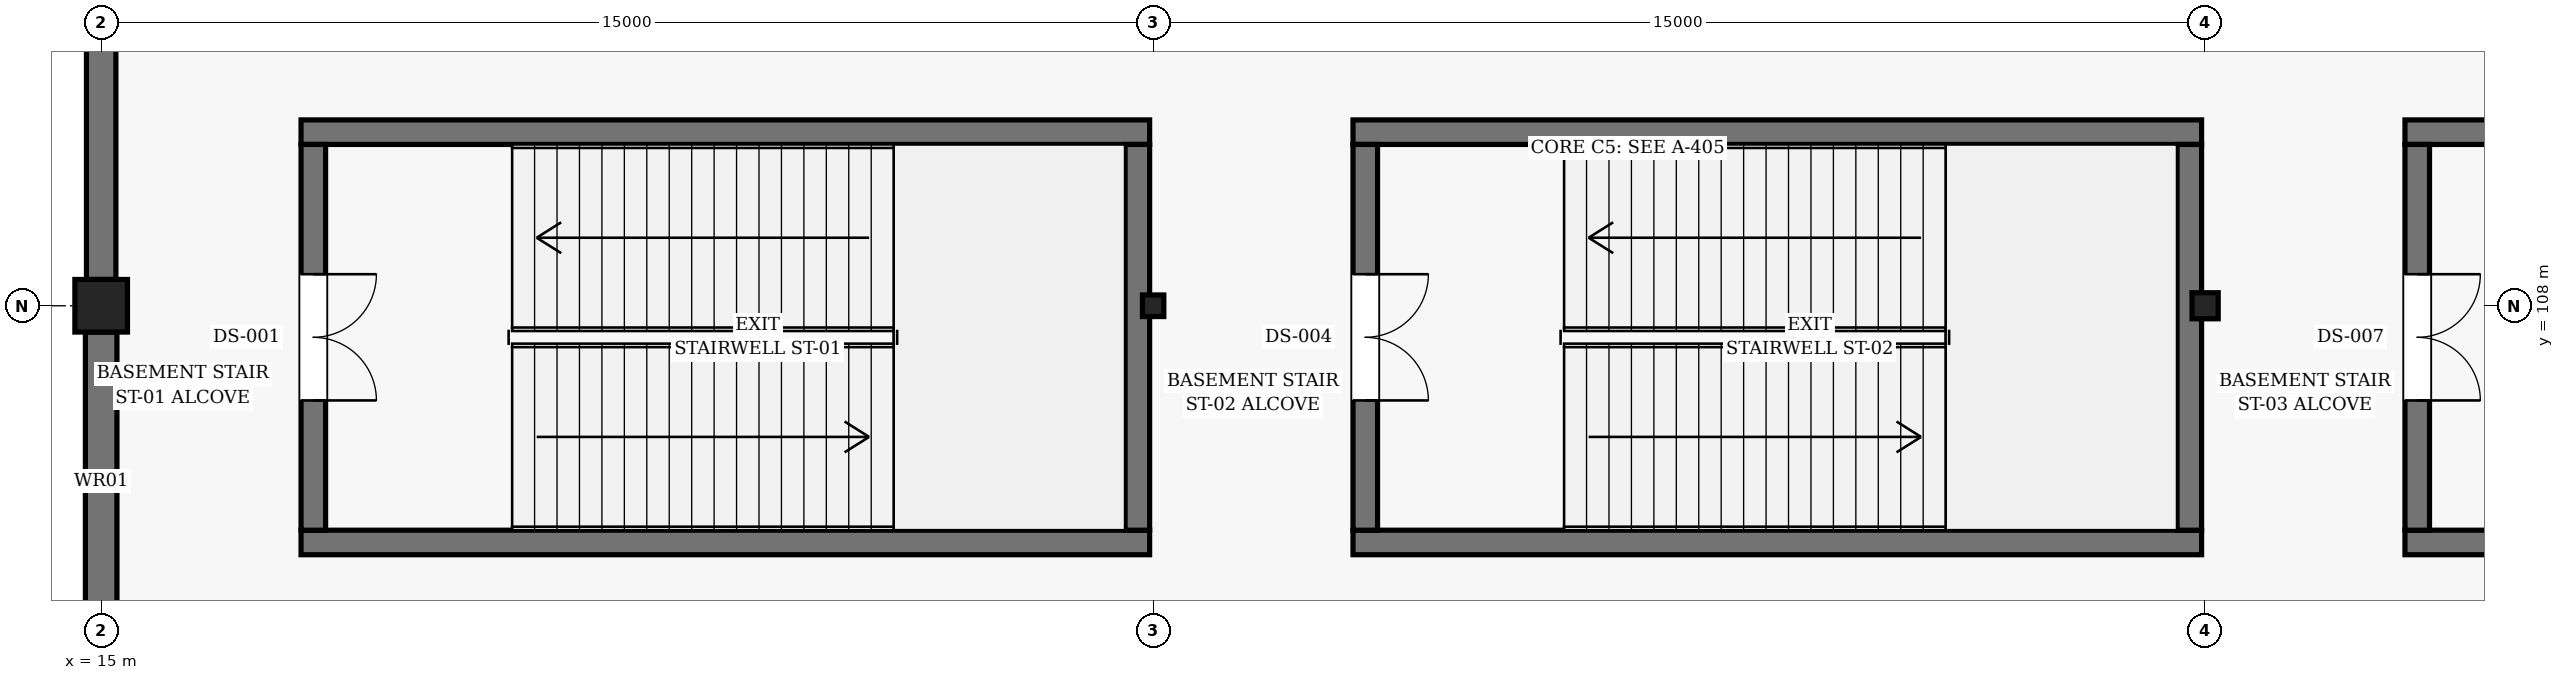
"""IFC4 building model, lengths in metres.
Left out: names, types, materials, properties, quantities, classifications, styles, units other than length and angle.
Written with IfcOpenShell. Run it as: python <this file> out.ifc"""

import sys

from ifc_helpers import new_model, si_unit, direction, frame, frame_2d, origin, origin_2d, place, context, subcontext, project, spatial, rectangle, i_section, extrude, element, fill, save


model = new_model("IFC4")
c1 = context("Model", 3, precision=1e-05, world=origin(), true_north=direction((0.0, 1.0)))
c2 = subcontext(c1, "Body", "Model", "MODEL_VIEW")
j1 = project(units=[si_unit("LENGTHUNIT", "METRE"), si_unit("PLANEANGLEUNIT", "RADIAN")], contexts=[c1])
p1 = place(None, origin())
s1 = spatial("IfcSite", under=j1, at=p1, CompositionType="ELEMENT")
p2 = place(p1, origin())
s2 = spatial("IfcBuilding", under=s1, at=p2, CompositionType="ELEMENT")
p3 = place(p2, frame((0.0, 0.0, -5.4)))
s3 = spatial("IfcBuildingStorey", under=s2, at=p3, CompositionType="ELEMENT", Elevation=-5.4)
p4 = place(p3, frame((15.0, 108.0, 0.0), z_axis=(0.0, 0.0, 1.0), x_axis=(1.0, 0.0, 0.0)))
e1 = element("IfcColumn", 1, at=p4, inside=s3, PredefinedType="COLUMN", context=c2, shape_type="SweptSolid", body=[
    extrude(rectangle(XDim=0.75, YDim=0.75, at=origin_2d()), origin(), (0.0, 0.0, 1.0), 5.4),
])
p5 = place(p3, frame((30.0, 108.0, 0.0), z_axis=(0.0, 0.0, 1.0), x_axis=(1.0, 0.0, 0.0)))
e2 = element("IfcColumn", 2, at=p5, inside=s3, PredefinedType="COLUMN", context=c2, shape_type="SweptSolid", body=[
    extrude(i_section(OverallWidth=0.305, OverallDepth=0.308, WebThickness=0.01, FlangeThickness=0.015, FilletRadius=0.015, at=origin_2d()), origin(), (0.0, 0.0, 1.0), 5.4),
])
p6 = place(p3, frame((45.0, 108.0, 0.0), z_axis=(0.0, 0.0, 1.0), x_axis=(1.0, 0.0, 0.0)))
e3 = element("IfcColumn", 3, at=p6, inside=s3, PredefinedType="COLUMN", context=c2, shape_type="SweptSolid", body=[
    extrude(i_section(OverallWidth=0.374, OverallDepth=0.372, WebThickness=0.016, FlangeThickness=0.026, FilletRadius=0.016, at=origin_2d()), origin(), (0.0, 0.0, 1.0), 5.4),
])
p7 = place(p3, frame((15.0, 103.375, 0.0), z_axis=(0.0, 0.0, 1.0), x_axis=(0.0, 1.0, 0.0)))
e4 = element("IfcWall", 4, at=p7, inside=s3, PredefinedType="USERDEFINED", context=c2, shape_type="SweptSolid", body=[
    extrude(rectangle(XDim=4.25, YDim=0.45, at=frame_2d((2.125, 0.0))), origin(), (0.0, 0.0, 1.0), 4.37),
])
p8 = place(p3, frame((15.0, 108.375, 0.0), z_axis=(0.0, 0.0, 1.0), x_axis=(0.0, 1.0, 0.0)))
e5 = element("IfcWall", 5, at=p8, inside=s3, PredefinedType="USERDEFINED", context=c2, shape_type="SweptSolid", body=[
    extrude(rectangle(XDim=8.25, YDim=0.42, at=frame_2d((4.125, 0.0))), origin(), (0.0, 0.0, 1.0), 4.381),
])
for number, where, z_axis, x_axis in (
    (6, (17.85, 104.625, 0.0), (0.0, 0.0, 1.0), (1.0, 0.0, 0.0)),
    (7, (29.95, 110.475, 0.0), (0.0, 0.0, 1.0), (-1.0, 0.0, 0.0)),
):
    element("IfcWall", number, at=place(p3, frame(where, z_axis=z_axis, x_axis=x_axis)), inside=s3, PredefinedType="SHEAR", context=c2, shape_type="SweptSolid", body=[
        extrude(rectangle(XDim=12.1, YDim=0.35, at=frame_2d((6.05, 0.0))), origin(), (0.0, 0.0, 1.0), 5.08),
    ])
p9 = place(p3, frame((18.025, 110.3, 0.0), z_axis=(0.0, 0.0, 1.0), x_axis=(0.0, -1.0, 0.0)))
e8 = element("IfcWall", 8, at=p9, inside=s3, PredefinedType="SHEAR", context=c2, shape_type="SweptSolid", body=[
    extrude(rectangle(XDim=5.5, YDim=0.35, at=frame_2d((2.75, 0.0))), origin(), (0.0, 0.0, 1.0), 5.08),
])
p10 = place(p9, frame((1.85, 0.0, 0.0)))
e9 = element("IfcOpeningElement", 9, at=p10, cuts=e8, PredefinedType="OPENING", context=c2, shape_type="SweptSolid", body=[
    extrude(rectangle(XDim=1.8, YDim=2.2, at=frame_2d((0.9, 1.1))), frame((0.0, 0.185, 0.0), z_axis=(0.0, -1.0, 0.0), x_axis=(1.0, 0.0, 0.0)), (0.0, 0.0, 1.0), 0.37),
])
p11 = place(p3, frame((29.775, 104.8, 0.0), z_axis=(0.0, 0.0, 1.0), x_axis=(0.0, 1.0, 0.0)))
e10 = element("IfcWall", 10, at=p11, inside=s3, PredefinedType="SHEAR", context=c2, shape_type="SweptSolid", body=[
    extrude(rectangle(XDim=5.5, YDim=0.35, at=frame_2d((2.75, 0.0))), origin(), (0.0, 0.0, 1.0), 5.08),
])
for number, where, z_axis, x_axis in (
    (11, (32.85, 104.625, 0.0), (0.0, 0.0, 1.0), (1.0, 0.0, 0.0)),
    (12, (44.95, 110.475, 0.0), (0.0, 0.0, 1.0), (-1.0, 0.0, 0.0)),
):
    element("IfcWall", number, at=place(p3, frame(where, z_axis=z_axis, x_axis=x_axis)), inside=s3, PredefinedType="SHEAR", context=c2, shape_type="SweptSolid", body=[
        extrude(rectangle(XDim=12.1, YDim=0.35, at=frame_2d((6.05, 0.0))), origin(), (0.0, 0.0, 1.0), 5.08),
    ])
p12 = place(p3, frame((33.025, 110.3, 0.0), z_axis=(0.0, 0.0, 1.0), x_axis=(0.0, -1.0, 0.0)))
e13 = element("IfcWall", 13, at=p12, inside=s3, PredefinedType="SHEAR", context=c2, shape_type="SweptSolid", body=[
    extrude(rectangle(XDim=5.5, YDim=0.35, at=frame_2d((2.75, 0.0))), origin(), (0.0, 0.0, 1.0), 5.08),
])
p13 = place(p12, frame((1.85, 0.0, 0.0)))
e14 = element("IfcOpeningElement", 14, at=p13, cuts=e13, PredefinedType="OPENING", context=c2, shape_type="SweptSolid", body=[
    extrude(rectangle(XDim=1.8, YDim=2.2, at=frame_2d((0.9, 1.1))), frame((0.0, 0.185, 0.0), z_axis=(0.0, -1.0, 0.0), x_axis=(1.0, 0.0, 0.0)), (0.0, 0.0, 1.0), 0.37),
])
p14 = place(p3, frame((44.775, 104.8, 0.0), z_axis=(0.0, 0.0, 1.0), x_axis=(0.0, 1.0, 0.0)))
e15 = element("IfcWall", 15, at=p14, inside=s3, PredefinedType="SHEAR", context=c2, shape_type="SweptSolid", body=[
    extrude(rectangle(XDim=5.5, YDim=0.35, at=frame_2d((2.75, 0.0))), origin(), (0.0, 0.0, 1.0), 5.08),
])
for number, where, z_axis, x_axis in (
    (16, (47.85, 104.625, 0.0), (0.0, 0.0, 1.0), (1.0, 0.0, 0.0)),
    (17, (59.95, 110.475, 0.0), (0.0, 0.0, 1.0), (-1.0, 0.0, 0.0)),
):
    element("IfcWall", number, at=place(p3, frame(where, z_axis=z_axis, x_axis=x_axis)), inside=s3, PredefinedType="SHEAR", context=c2, shape_type="SweptSolid", body=[
        extrude(rectangle(XDim=12.1, YDim=0.35, at=frame_2d((6.05, 0.0))), origin(), (0.0, 0.0, 1.0), 5.08),
    ])
p15 = place(p3, frame((48.025, 110.3, 0.0), z_axis=(0.0, 0.0, 1.0), x_axis=(0.0, -1.0, 0.0)))
e18 = element("IfcWall", 18, at=p15, inside=s3, PredefinedType="SHEAR", context=c2, shape_type="SweptSolid", body=[
    extrude(rectangle(XDim=5.5, YDim=0.35, at=frame_2d((2.75, 0.0))), origin(), (0.0, 0.0, 1.0), 5.08),
])
p16 = place(p15, frame((1.85, 0.0, 0.0)))
e19 = element("IfcOpeningElement", 19, at=p16, cuts=e18, PredefinedType="OPENING", context=c2, shape_type="SweptSolid", body=[
    extrude(rectangle(XDim=1.8, YDim=2.2, at=frame_2d((0.9, 1.1))), frame((0.0, 0.185, 0.0), z_axis=(0.0, -1.0, 0.0), x_axis=(1.0, 0.0, 0.0)), (0.0, 0.0, 1.0), 0.37),
])
p17 = place(p10, origin())
e20 = element("IfcDoor", 20, at=p17, inside=s3, OperationType="DOUBLE_DOOR_SINGLE_SWING", PredefinedType="DOOR", context=c2, shape_type="SweptSolid", body=[
    extrude(rectangle(XDim=1.8, YDim=2.2, at=frame_2d((0.9, 1.1))), frame((0.0, 0.025, 0.0), z_axis=(0.0, -1.0, 0.0), x_axis=(1.0, 0.0, 0.0)), (0.0, 0.0, 1.0), 0.05),
])
fill(e9, e20)
p18 = place(p13, origin())
e21 = element("IfcDoor", 21, at=p18, inside=s3, OperationType="DOUBLE_DOOR_SINGLE_SWING", PredefinedType="DOOR", context=c2, shape_type="SweptSolid", body=[
    extrude(rectangle(XDim=1.8, YDim=2.2, at=frame_2d((0.9, 1.1))), frame((0.0, 0.025, 0.0), z_axis=(0.0, -1.0, 0.0), x_axis=(1.0, 0.0, 0.0)), (0.0, 0.0, 1.0), 0.05),
])
fill(e14, e21)
p19 = place(p16, origin())
e22 = element("IfcDoor", 22, at=p19, inside=s3, OperationType="DOUBLE_DOOR_SINGLE_SWING", PredefinedType="DOOR", context=c2, shape_type="SweptSolid", body=[
    extrude(rectangle(XDim=1.8, YDim=2.2, at=frame_2d((0.9, 1.1))), frame((0.0, 0.025, 0.0), z_axis=(0.0, -1.0, 0.0), x_axis=(1.0, 0.0, 0.0)), (0.0, 0.0, 1.0), 0.05),
])
fill(e19, e22)
save(model, sys.argv[1])
